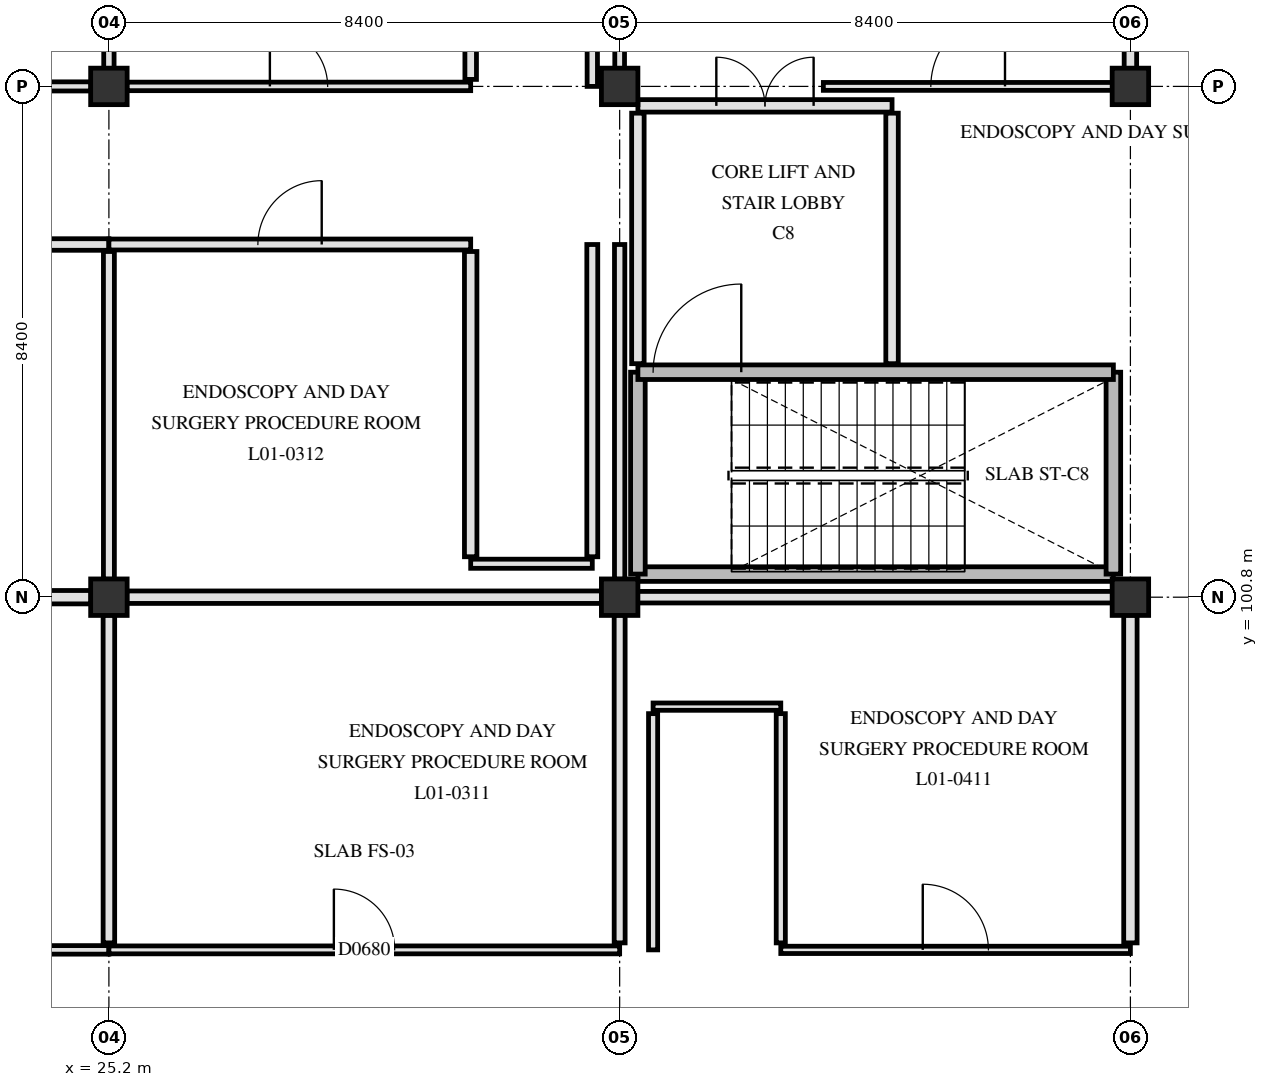
"""IFC4 building model, lengths in metres.
Left out: names, types, materials, properties, quantities, classifications, styles, units other than length and angle.
Written with IfcOpenShell. Run it as: python <this file> out.ifc"""

import sys

from ifc_helpers import new_model, si_unit, direction, frame, frame_2d, origin, origin_2d, place, context, subcontext, project, spatial, rectangle, extrude, element, fill, save


model = new_model("IFC4")
c1 = context("Model", 3, precision=1e-05, world=origin(), true_north=direction((0.0, 1.0)))
c2 = subcontext(c1, "Body", "Model", "MODEL_VIEW")
j1 = project(units=[si_unit("LENGTHUNIT", "METRE"), si_unit("PLANEANGLEUNIT", "RADIAN")], contexts=[c1])
p1 = place(None, origin())
s1 = spatial("IfcSite", under=j1, at=p1, CompositionType="ELEMENT")
p2 = place(p1, origin())
s2 = spatial("IfcBuilding", under=s1, at=p2, CompositionType="ELEMENT")
p3 = place(p2, frame((0.0, 0.0, 4.8)))
s3 = spatial("IfcBuildingStorey", under=s2, at=p3, CompositionType="ELEMENT", Elevation=4.8)
for number, where, z_axis, x_axis in (
    (1, (25.2, 100.8, 0.0), (0.0, 0.0, 1.0), (1.0, 0.0, 0.0)),
    (2, (25.2, 109.2, 0.0), (0.0, 0.0, 1.0), (1.0, 0.0, 0.0)),
    (3, (33.6, 100.8, 0.0), (0.0, 0.0, 1.0), (1.0, 0.0, 0.0)),
    (4, (33.6, 109.2, 0.0), (0.0, 0.0, 1.0), (1.0, 0.0, 0.0)),
    (5, (42.0, 100.8, 0.0), (0.0, 0.0, 1.0), (1.0, 0.0, 0.0)),
    (6, (42.0, 109.2, 0.0), (0.0, 0.0, 1.0), (1.0, 0.0, 0.0)),
):
    element("IfcColumn", number, at=place(p3, frame(where, z_axis=z_axis, x_axis=x_axis)), inside=s3, PredefinedType="COLUMN", context=c2, shape_type="SweptSolid", body=[
        extrude(rectangle(XDim=0.6, YDim=0.6, at=origin_2d()), origin(), (0.0, 0.0, 1.0), 4.5),
    ])
p4 = place(p3, frame((33.9, 101.18, 0.0), z_axis=(0.0, 0.0, 1.0), x_axis=(1.0, 0.0, 0.0)))
e7 = element("IfcWall", 7, at=p4, inside=s3, PredefinedType="SHEAR", context=c2, shape_type="SweptSolid", body=[
    extrude(rectangle(XDim=7.82, YDim=0.24, at=frame_2d((3.91, 0.0))), origin(), (0.0, 0.0, 1.0), 4.15),
])
for number, where, z_axis, x_axis in (
    (8, (33.9, 101.18, 0.0), (0.0, 0.0, 1.0), (0.0, 1.0, 0.0)),
    (9, (41.72, 101.18, 0.0), (0.0, 0.0, 1.0), (0.0, 1.0, 0.0)),
):
    element("IfcWall", number, at=place(p3, frame(where, z_axis=z_axis, x_axis=x_axis)), inside=s3, PredefinedType="SHEAR", context=c2, shape_type="SweptSolid", body=[
        extrude(rectangle(XDim=3.32, YDim=0.24, at=frame_2d((1.66, 0.0))), origin(), (0.0, 0.0, 1.0), 4.15),
    ])
p5 = place(p3, frame((33.9, 104.5, 0.0), z_axis=(0.0, 0.0, 1.0), x_axis=(1.0, 0.0, 0.0)))
e10 = element("IfcWall", 10, at=p5, inside=s3, PredefinedType="SHEAR", context=c2, shape_type="SweptSolid", body=[
    extrude(rectangle(XDim=7.82, YDim=0.24, at=frame_2d((3.91, 0.0))), origin(), (0.0, 0.0, 1.0), 4.15),
])
p6 = place(p5, frame((0.25, 0.0, 0.0)))
e11 = element("IfcOpeningElement", 11, at=p6, cuts=e10, PredefinedType="OPENING", context=c2, shape_type="SweptSolid", body=[
    extrude(rectangle(XDim=1.45, YDim=2.2, at=frame_2d((0.725, 1.1))), frame((0.0, 0.13, 0.0), z_axis=(0.0, -1.0, 0.0), x_axis=(1.0, 0.0, 0.0)), (0.0, 0.0, 1.0), 0.26),
])
p7 = place(p3, frame((38.08, 104.64, 0.0), z_axis=(0.0, 0.0, 1.0), x_axis=(0.0, 1.0, 0.0)))
e12 = element("IfcWall", 12, at=p7, inside=s3, PredefinedType="PARTITIONING", context=c2, shape_type="SweptSolid", body=[
    extrude(rectangle(XDim=4.12, YDim=0.205, at=frame_2d((2.06, 0.0))), origin(), (0.0, 0.0, 1.0), 4.14),
])
p8 = place(p3, frame((33.9, 104.64, 0.0), z_axis=(0.0, 0.0, 1.0), x_axis=(0.0, 1.0, 0.0)))
e13 = element("IfcWall", 13, at=p8, inside=s3, PredefinedType="PARTITIONING", context=c2, shape_type="SweptSolid", body=[
    extrude(rectangle(XDim=4.12, YDim=0.205, at=frame_2d((2.06, 0.0))), origin(), (0.0, 0.0, 1.0), 3.59),
])
p9 = place(p3, frame((33.9, 108.88, 0.0), z_axis=(0.0, 0.0, 1.0), x_axis=(1.0, 0.0, 0.0)))
e14 = element("IfcWall", 14, at=p9, inside=s3, PredefinedType="PARTITIONING", context=c2, shape_type="SweptSolid", body=[
    extrude(rectangle(XDim=4.18, YDim=0.205, at=frame_2d((2.09, 0.0))), origin(), (0.0, 0.0, 1.0), 3.54),
])
p10 = place(p9, frame((1.29, 0.0, 0.0)))
e15 = element("IfcOpeningElement", 15, at=p10, cuts=e14, PredefinedType="OPENING", context=c2, shape_type="SweptSolid", body=[
    extrude(rectangle(XDim=1.6, YDim=2.25, at=frame_2d((0.8, 1.125))), frame((0.0, 0.113, 0.0), z_axis=(0.0, -1.0, 0.0), x_axis=(1.0, 0.0, 0.0)), (0.0, 0.0, 1.0), 0.225),
])
p11 = place(p3, frame((16.8, 95.0, 0.0), z_axis=(0.0, 0.0, 1.0), x_axis=(1.0, 0.0, 0.0)))
e16 = element("IfcWall", 16, at=p11, inside=s3, PredefinedType="PARTITIONING", context=c2, shape_type="SweptSolid", body=[
    extrude(rectangle(XDim=8.4, YDim=0.14, at=frame_2d((4.2, 0.0))), origin(), (0.0, 0.0, 1.0), 3.59),
])
p12 = place(p11, frame((3.59, 0.0, 0.0)))
e17 = element("IfcOpeningElement", 17, at=p12, cuts=e16, PredefinedType="OPENING", context=c2, shape_type="SweptSolid", body=[
    extrude(rectangle(XDim=1.22, YDim=2.18, at=frame_2d((0.61, 1.09))), frame((0.0, 0.08, 0.0), z_axis=(0.0, -1.0, 0.0), x_axis=(1.0, 0.0, 0.0)), (0.0, 0.0, 1.0), 0.16),
])
p13 = place(p3, frame((25.2, 95.0, 0.0), z_axis=(0.0, 0.0, 1.0), x_axis=(1.0, 0.0, 0.0)))
e18 = element("IfcWall", 18, at=p13, inside=s3, PredefinedType="PARTITIONING", context=c2, shape_type="SweptSolid", body=[
    extrude(rectangle(XDim=8.4, YDim=0.13, at=frame_2d((4.2, 0.0))), origin(), (0.0, 0.0, 1.0), 3.59),
])
p14 = place(p13, frame((3.7, 0.0, 0.0)))
e19 = element("IfcOpeningElement", 19, at=p14, cuts=e18, PredefinedType="OPENING", context=c2, shape_type="SweptSolid", body=[
    extrude(rectangle(XDim=1.0, YDim=2.15, at=frame_2d((0.5, 1.075))), frame((0.0, 0.075, 0.0), z_axis=(0.0, -1.0, 0.0), x_axis=(1.0, 0.0, 0.0)), (0.0, 0.0, 1.0), 0.15),
])
p15 = place(p3, frame((36.25, 95.0, 0.0), z_axis=(0.0, 0.0, 1.0), x_axis=(1.0, 0.0, 0.0)))
e20 = element("IfcWall", 20, at=p15, inside=s3, PredefinedType="PARTITIONING", context=c2, shape_type="SweptSolid", body=[
    extrude(rectangle(XDim=5.75, YDim=0.12, at=frame_2d((2.875, 0.0))), origin(), (0.0, 0.0, 1.0), 3.59),
])
p16 = place(p15, frame((2.335, 0.0, 0.0)))
e21 = element("IfcOpeningElement", 21, at=p16, cuts=e20, PredefinedType="OPENING", context=c2, shape_type="SweptSolid", body=[
    extrude(rectangle(XDim=1.08, YDim=2.12, at=frame_2d((0.54, 1.06))), frame((0.0, 0.07, 0.0), z_axis=(0.0, -1.0, 0.0), x_axis=(1.0, 0.0, 0.0)), (0.0, 0.0, 1.0), 0.14),
])
p17 = place(p3, frame((34.15, 99.0, 0.0), z_axis=(0.0, 0.0, 1.0), x_axis=(1.0, 0.0, 0.0)))
e22 = element("IfcWall", 22, at=p17, inside=s3, PredefinedType="PARTITIONING", context=c2, shape_type="SweptSolid", body=[
    extrude(rectangle(XDim=2.1, YDim=0.12, at=frame_2d((1.05, 0.0))), origin(), (0.0, 0.0, 1.0), 4.14),
])
p18 = place(p3, frame((17.095, 100.8, 0.0), z_axis=(0.0, 0.0, 1.0), x_axis=(1.0, 0.0, 0.0)))
e23 = element("IfcWall", 23, at=p18, inside=s3, PredefinedType="PARTITIONING", context=c2, shape_type="SweptSolid", body=[
    extrude(rectangle(XDim=7.81, YDim=0.22, at=frame_2d((3.905, 0.0))), origin(), (0.0, 0.0, 1.0), 3.54),
])
p19 = place(p3, frame((25.495, 100.8, 0.0), z_axis=(0.0, 0.0, 1.0), x_axis=(1.0, 0.0, 0.0)))
e24 = element("IfcWall", 24, at=p19, inside=s3, PredefinedType="PARTITIONING", context=c2, shape_type="SweptSolid", body=[
    extrude(rectangle(XDim=7.81, YDim=0.205, at=frame_2d((3.905, 0.0))), origin(), (0.0, 0.0, 1.0), 3.54),
])
p20 = place(p3, frame((33.895, 100.8, 0.0), z_axis=(0.0, 0.0, 1.0), x_axis=(1.0, 0.0, 0.0)))
e25 = element("IfcWall", 25, at=p20, inside=s3, PredefinedType="PARTITIONING", context=c2, shape_type="SweptSolid", body=[
    extrude(rectangle(XDim=7.81, YDim=0.19, at=frame_2d((3.905, 0.0))), origin(), (0.0, 0.0, 1.0), 3.54),
])
p21 = place(p3, frame((31.15, 101.35, 0.0), z_axis=(0.0, 0.0, 1.0), x_axis=(1.0, 0.0, 0.0)))
e26 = element("IfcWall", 26, at=p21, inside=s3, PredefinedType="PARTITIONING", context=c2, shape_type="SweptSolid", body=[
    extrude(rectangle(XDim=2.0, YDim=0.15, at=frame_2d((1.0, 0.0))), origin(), (0.0, 0.0, 1.0), 4.14),
])
p22 = place(p3, frame((16.8, 106.6, 0.0), z_axis=(0.0, 0.0, 1.0), x_axis=(1.0, 0.0, 0.0)))
e27 = element("IfcWall", 27, at=p22, inside=s3, PredefinedType="PARTITIONING", context=c2, shape_type="SweptSolid", body=[
    extrude(rectangle(XDim=8.4, YDim=0.19, at=frame_2d((4.2, 0.0))), origin(), (0.0, 0.0, 1.0), 3.59),
])
p23 = place(p22, frame((3.54, 0.0, 0.0)))
e28 = element("IfcOpeningElement", 28, at=p23, cuts=e27, PredefinedType="OPENING", context=c2, shape_type="SweptSolid", body=[
    extrude(rectangle(XDim=1.32, YDim=2.18, at=frame_2d((0.66, 1.09))), frame((0.0, 0.105, 0.0), z_axis=(0.0, -1.0, 0.0), x_axis=(1.0, 0.0, 0.0)), (0.0, 0.0, 1.0), 0.21),
])
p24 = place(p3, frame((25.2, 106.6, 0.0), z_axis=(0.0, 0.0, 1.0), x_axis=(1.0, 0.0, 0.0)))
e29 = element("IfcWall", 29, at=p24, inside=s3, PredefinedType="PARTITIONING", context=c2, shape_type="SweptSolid", body=[
    extrude(rectangle(XDim=5.95, YDim=0.18, at=frame_2d((2.975, 0.0))), origin(), (0.0, 0.0, 1.0), 3.59),
])
p25 = place(p24, frame((2.45, 0.0, 0.0)))
e30 = element("IfcOpeningElement", 30, at=p25, cuts=e29, PredefinedType="OPENING", context=c2, shape_type="SweptSolid", body=[
    extrude(rectangle(XDim=1.05, YDim=2.15, at=frame_2d((0.525, 1.075))), frame((0.0, 0.1, 0.0), z_axis=(0.0, -1.0, 0.0), x_axis=(1.0, 0.0, 0.0)), (0.0, 0.0, 1.0), 0.2),
])
p26 = place(p3, frame((17.095, 109.2, 0.0), z_axis=(0.0, 0.0, 1.0), x_axis=(1.0, 0.0, 0.0)))
e31 = element("IfcWall", 31, at=p26, inside=s3, PredefinedType="PARTITIONING", context=c2, shape_type="SweptSolid", body=[
    extrude(rectangle(XDim=7.81, YDim=0.15, at=frame_2d((3.905, 0.0))), origin(), (0.0, 0.0, 1.0), 3.54),
])
p27 = place(p26, frame((3.445, 0.0, 0.0)))
e32 = element("IfcOpeningElement", 32, at=p27, cuts=e31, PredefinedType="OPENING", context=c2, shape_type="SweptSolid", body=[
    extrude(rectangle(XDim=0.92, YDim=2.08, at=frame_2d((0.46, 1.04))), frame((0.0, 0.085, 0.0), z_axis=(0.0, -1.0, 0.0), x_axis=(1.0, 0.0, 0.0)), (0.0, 0.0, 1.0), 0.17),
])
p28 = place(p3, frame((25.495, 109.2, 0.0), z_axis=(0.0, 0.0, 1.0), x_axis=(1.0, 0.0, 0.0)))
e33 = element("IfcWall", 33, at=p28, inside=s3, PredefinedType="PARTITIONING", context=c2, shape_type="SweptSolid", body=[
    extrude(rectangle(XDim=5.655, YDim=0.14, at=frame_2d((2.827, 0.0))), origin(), (0.0, 0.0, 1.0), 3.54),
])
p29 = place(p28, frame((2.353, 0.0, 0.0)))
e34 = element("IfcOpeningElement", 34, at=p29, cuts=e33, PredefinedType="OPENING", context=c2, shape_type="SweptSolid", body=[
    extrude(rectangle(XDim=0.95, YDim=2.1, at=frame_2d((0.475, 1.05))), frame((0.0, 0.08, 0.0), z_axis=(0.0, -1.0, 0.0), x_axis=(1.0, 0.0, 0.0)), (0.0, 0.0, 1.0), 0.16),
])
p30 = place(p3, frame((36.95, 109.2, 0.0), z_axis=(0.0, 0.0, 1.0), x_axis=(1.0, 0.0, 0.0)))
e35 = element("IfcWall", 35, at=p30, inside=s3, PredefinedType="PARTITIONING", context=c2, shape_type="SweptSolid", body=[
    extrude(rectangle(XDim=4.755, YDim=0.13, at=frame_2d((2.377, 0.0))), origin(), (0.0, 0.0, 1.0), 3.54),
])
p31 = place(p30, frame((1.768, 0.0, 0.0)))
e36 = element("IfcOpeningElement", 36, at=p31, cuts=e35, PredefinedType="OPENING", context=c2, shape_type="SweptSolid", body=[
    extrude(rectangle(XDim=1.22, YDim=2.18, at=frame_2d((0.61, 1.09))), frame((0.0, 0.075, 0.0), z_axis=(0.0, -1.0, 0.0), x_axis=(1.0, 0.0, 0.0)), (0.0, 0.0, 1.0), 0.15),
])
p32 = place(p3, frame((25.2, 95.115, 0.0), z_axis=(0.0, 0.0, 1.0), x_axis=(0.0, 1.0, 0.0)))
e37 = element("IfcWall", 37, at=p32, inside=s3, PredefinedType="PARTITIONING", context=c2, shape_type="SweptSolid", body=[
    extrude(rectangle(XDim=5.39, YDim=0.19, at=frame_2d((2.695, 0.0))), origin(), (0.0, 0.0, 1.0), 3.59),
])
p33 = place(p3, frame((25.2, 101.095, 0.0), z_axis=(0.0, 0.0, 1.0), x_axis=(0.0, 1.0, 0.0)))
e38 = element("IfcWall", 38, at=p33, inside=s3, PredefinedType="PARTITIONING", context=c2, shape_type="SweptSolid", body=[
    extrude(rectangle(XDim=5.39, YDim=0.18, at=frame_2d((2.695, 0.0))), origin(), (0.0, 0.0, 1.0), 3.59),
])
p34 = place(p3, frame((25.2, 109.495, 0.0), z_axis=(0.0, 0.0, 1.0), x_axis=(0.0, 1.0, 0.0)))
e39 = element("IfcWall", 39, at=p34, inside=s3, PredefinedType="PARTITIONING", context=c2, shape_type="SweptSolid", body=[
    extrude(rectangle(XDim=7.81, YDim=0.17, at=frame_2d((3.905, 0.0))), origin(), (0.0, 0.0, 1.0), 3.59),
])
p35 = place(p3, frame((31.15, 101.465, 0.0), z_axis=(0.0, 0.0, 1.0), x_axis=(0.0, 1.0, 0.0)))
e40 = element("IfcWall", 40, at=p35, inside=s3, PredefinedType="PARTITIONING", context=c2, shape_type="SweptSolid", body=[
    extrude(rectangle(XDim=5.02, YDim=0.205, at=frame_2d((2.51, 0.0))), origin(), (0.0, 0.0, 1.0), 4.14),
])
p36 = place(p3, frame((31.15, 109.315, 0.0), z_axis=(0.0, 0.0, 1.0), x_axis=(0.0, 1.0, 0.0)))
e41 = element("IfcWall", 41, at=p36, inside=s3, PredefinedType="PARTITIONING", context=c2, shape_type="SweptSolid", body=[
    extrude(rectangle(XDim=2.22, YDim=0.19, at=frame_2d((1.11, 0.0))), origin(), (0.0, 0.0, 1.0), 3.54),
])
p37 = place(p3, frame((33.15, 101.465, 0.0), z_axis=(0.0, 0.0, 1.0), x_axis=(0.0, 1.0, 0.0)))
e42 = element("IfcWall", 42, at=p37, inside=s3, PredefinedType="PARTITIONING", context=c2, shape_type="SweptSolid", body=[
    extrude(rectangle(XDim=5.135, YDim=0.18, at=frame_2d((2.567, 0.0))), origin(), (0.0, 0.0, 1.0), 4.14),
])
p38 = place(p3, frame((33.15, 109.2, 0.0), z_axis=(0.0, 0.0, 1.0), x_axis=(0.0, 1.0, 0.0)))
e43 = element("IfcWall", 43, at=p38, inside=s3, PredefinedType="PARTITIONING", context=c2, shape_type="SweptSolid", body=[
    extrude(rectangle(XDim=2.335, YDim=0.17, at=frame_2d((1.167, 0.0))), origin(), (0.0, 0.0, 1.0), 3.54),
])
p39 = place(p3, frame((33.6, 95.115, 0.0), z_axis=(0.0, 0.0, 1.0), x_axis=(0.0, 1.0, 0.0)))
e44 = element("IfcWall", 44, at=p39, inside=s3, PredefinedType="PARTITIONING", context=c2, shape_type="SweptSolid", body=[
    extrude(rectangle(XDim=5.39, YDim=0.18, at=frame_2d((2.695, 0.0))), origin(), (0.0, 0.0, 1.0), 3.59),
])
p40 = place(p3, frame((33.6, 101.095, 0.0), z_axis=(0.0, 0.0, 1.0), x_axis=(0.0, 1.0, 0.0)))
e45 = element("IfcWall", 45, at=p40, inside=s3, PredefinedType="PARTITIONING", context=c2, shape_type="SweptSolid", body=[
    extrude(rectangle(XDim=5.505, YDim=0.17, at=frame_2d((2.752, 0.0))), origin(), (0.0, 0.0, 1.0), 3.59),
])
p41 = place(p3, frame((33.6, 109.495, 0.0), z_axis=(0.0, 0.0, 1.0), x_axis=(0.0, 1.0, 0.0)))
e46 = element("IfcWall", 46, at=p41, inside=s3, PredefinedType="PARTITIONING", context=c2, shape_type="SweptSolid", body=[
    extrude(rectangle(XDim=7.66, YDim=0.16, at=frame_2d((3.83, 0.0))), origin(), (0.0, 0.0, 1.0), 3.59),
])
p42 = place(p3, frame((34.15, 95.0, 0.0), z_axis=(0.0, 0.0, 1.0), x_axis=(0.0, 1.0, 0.0)))
e47 = element("IfcWall", 47, at=p42, inside=s3, PredefinedType="PARTITIONING", context=c2, shape_type="SweptSolid", body=[
    extrude(rectangle(XDim=3.885, YDim=0.15, at=frame_2d((1.942, 0.0))), origin(), (0.0, 0.0, 1.0), 4.14),
])
p43 = place(p3, frame((36.25, 95.115, 0.0), z_axis=(0.0, 0.0, 1.0), x_axis=(0.0, 1.0, 0.0)))
e48 = element("IfcWall", 48, at=p43, inside=s3, PredefinedType="PARTITIONING", context=c2, shape_type="SweptSolid", body=[
    extrude(rectangle(XDim=3.77, YDim=0.15, at=frame_2d((1.885, 0.0))), origin(), (0.0, 0.0, 1.0), 4.14),
])
p44 = place(p3, frame((42.0, 95.115, 0.0), z_axis=(0.0, 0.0, 1.0), x_axis=(0.0, 1.0, 0.0)))
e49 = element("IfcWall", 49, at=p44, inside=s3, PredefinedType="PARTITIONING", context=c2, shape_type="SweptSolid", body=[
    extrude(rectangle(XDim=5.39, YDim=0.22, at=frame_2d((2.695, 0.0))), origin(), (0.0, 0.0, 1.0), 3.59),
])
p45 = place(p3, frame((42.0, 109.495, 0.0), z_axis=(0.0, 0.0, 1.0), x_axis=(0.0, 1.0, 0.0)))
e50 = element("IfcWall", 50, at=p45, inside=s3, PredefinedType="PARTITIONING", context=c2, shape_type="SweptSolid", body=[
    extrude(rectangle(XDim=7.81, YDim=0.205, at=frame_2d((3.905, 0.0))), origin(), (0.0, 0.0, 1.0), 3.59),
])
p46 = place(p6, origin())
e51 = element("IfcDoor", 51, at=p46, inside=s3, OperationType="SINGLE_SWING_RIGHT", PredefinedType="DOOR", context=c2, shape_type="SweptSolid", body=[
    extrude(rectangle(XDim=1.45, YDim=2.2, at=frame_2d((0.725, 1.1))), frame((0.0, 0.025, 0.0), z_axis=(0.0, -1.0, 0.0), x_axis=(1.0, 0.0, 0.0)), (0.0, 0.0, 1.0), 0.05),
])
fill(e11, e51)
p47 = place(p10, origin())
e52 = element("IfcDoor", 52, at=p47, inside=s3, OperationType="DOUBLE_SWING_LEFT", PredefinedType="DOOR", context=c2, shape_type="SweptSolid", body=[
    extrude(rectangle(XDim=1.6, YDim=2.25, at=frame_2d((0.8, 1.125))), frame((0.0, 0.025, 0.0), z_axis=(0.0, -1.0, 0.0), x_axis=(1.0, 0.0, 0.0)), (0.0, 0.0, 1.0), 0.05),
])
fill(e15, e52)
p48 = place(p14, origin())
e53 = element("IfcDoor", 53, at=p48, inside=s3, OperationType="SINGLE_SWING_LEFT", PredefinedType="DOOR", context=c2, shape_type="SweptSolid", body=[
    extrude(rectangle(XDim=1.0, YDim=2.15, at=frame_2d((0.5, 1.075))), frame((0.0, 0.025, 0.0), z_axis=(0.0, -1.0, 0.0), x_axis=(1.0, 0.0, 0.0)), (0.0, 0.0, 1.0), 0.05),
])
fill(e19, e53)
p49 = place(p25, origin())
e54 = element("IfcDoor", 54, at=p49, inside=s3, OperationType="SINGLE_SWING_RIGHT", PredefinedType="DOOR", context=c2, shape_type="SweptSolid", body=[
    extrude(rectangle(XDim=1.05, YDim=2.15, at=frame_2d((0.525, 1.075))), frame((0.0, 0.025, 0.0), z_axis=(0.0, -1.0, 0.0), x_axis=(1.0, 0.0, 0.0)), (0.0, 0.0, 1.0), 0.05),
])
fill(e30, e54)
p50 = place(p29, origin())
e55 = element("IfcDoor", 55, at=p50, inside=s3, OperationType="SINGLE_SWING_LEFT", PredefinedType="DOOR", context=c2, shape_type="SweptSolid", body=[
    extrude(rectangle(XDim=0.95, YDim=2.1, at=frame_2d((0.475, 1.05))), frame((0.0, 0.025, 0.0), z_axis=(0.0, -1.0, 0.0), x_axis=(1.0, 0.0, 0.0)), (0.0, 0.0, 1.0), 0.05),
])
fill(e34, e55)
p51 = place(p16, origin())
e56 = element("IfcDoor", 56, at=p51, inside=s3, OperationType="SINGLE_SWING_LEFT", PredefinedType="DOOR", context=c2, shape_type="SweptSolid", body=[
    extrude(rectangle(XDim=1.08, YDim=2.12, at=frame_2d((0.54, 1.06))), frame((0.0, 0.025, 0.0), z_axis=(0.0, -1.0, 0.0), x_axis=(1.0, 0.0, 0.0)), (0.0, 0.0, 1.0), 0.05),
])
fill(e21, e56)
p52 = place(p31, origin())
e57 = element("IfcDoor", 57, at=p52, inside=s3, OperationType="SINGLE_SWING_RIGHT", PredefinedType="DOOR", context=c2, shape_type="SweptSolid", body=[
    extrude(rectangle(XDim=1.22, YDim=2.18, at=frame_2d((0.61, 1.09))), frame((0.0, 0.025, 0.0), z_axis=(0.0, -1.0, 0.0), x_axis=(1.0, 0.0, 0.0)), (0.0, 0.0, 1.0), 0.05),
])
fill(e36, e57)
save(model, sys.argv[1])
